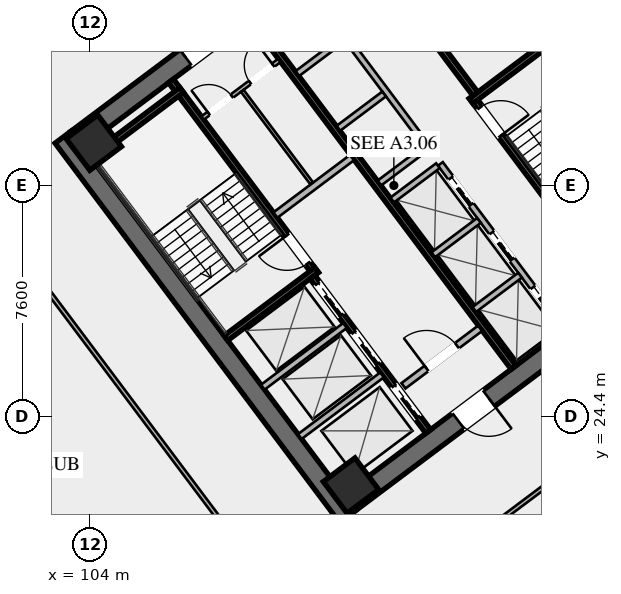
"""IFC4 building model, lengths in metres.
Left out: names, types, materials, properties, quantities, classifications, styles, units other than length and angle.
Written with IfcOpenShell. Run it as: python <this file> out.ifc"""

import sys

from ifc_helpers import new_model, si_unit, direction, frame, frame_2d, origin, origin_2d, place, context, subcontext, project, spatial, rectangle, hollow_rectangle, extrude, element, fill, save


model = new_model("IFC4")
c1 = context("Model", 3, precision=1e-05, world=origin(), true_north=direction((0.0, 1.0)))
c2 = subcontext(c1, "Body", "Model", "MODEL_VIEW")
j1 = project(units=[si_unit("LENGTHUNIT", "METRE"), si_unit("PLANEANGLEUNIT", "RADIAN")], contexts=[c1])
p1 = place(None, origin())
s1 = spatial("IfcSite", under=j1, at=p1, CompositionType="ELEMENT")
p2 = place(p1, origin())
s2 = spatial("IfcBuilding", under=s1, at=p2, CompositionType="ELEMENT")
p3 = place(p2, frame((0.0, 0.0, 24.6)))
s3 = spatial("IfcBuildingStorey", under=s2, at=p3, CompositionType="ELEMENT", Elevation=24.6)
for number, where, z_axis, x_axis in (
    (1, (112.476, 21.107, 0.0), (0.0, 0.0, 1.0), (-0.6, 0.8, 0.0)),
    (2, (115.524, 42.893, 0.0), (0.0, 0.0, 1.0), (0.6, -0.8, 0.0)),
):
    element("IfcWall", number, at=place(p3, frame(where, z_axis=z_axis, x_axis=x_axis)), inside=s3, PredefinedType="SHEAR", context=c2, shape_type="SweptSolid", body=[
        extrude(rectangle(XDim=15.6, YDim=0.65, at=frame_2d((7.8, 0.0))), origin(), (0.0, 0.0, 1.0), 3.55),
    ])
p4 = place(p3, frame((124.429, 30.478, 0.0), z_axis=(0.0, 0.0, 1.0), x_axis=(-0.799998028465, -0.600002628705, 0.0)))
e3 = element("IfcWall", 3, at=p4, inside=s3, PredefinedType="SHEAR", context=c2, shape_type="SweptSolid", body=[
    extrude(rectangle(XDim=14.86, YDim=0.65, at=frame_2d((7.43, 0.0))), origin(), (0.0, 0.0, 1.0), 3.55),
])
p5 = place(p4, frame((9.13, 0.0, 0.0)))
e4 = element("IfcOpeningElement", 4, at=p5, cuts=e3, PredefinedType="OPENING", context=c2, shape_type="SweptSolid", body=[
    extrude(rectangle(XDim=1.25, YDim=2.25, at=frame_2d((0.625, 1.125))), frame((0.0, 0.335, 0.0), z_axis=(0.0, -1.0, 0.0), x_axis=(1.0, 0.0, 0.0)), (0.0, 0.0, 1.0), 0.67),
])
p6 = place(p4, frame((4.08, 0.0, 0.0)))
e5 = element("IfcOpeningElement", 5, at=p6, cuts=e3, PredefinedType="OPENING", context=c2, shape_type="SweptSolid", body=[
    extrude(rectangle(XDim=1.25, YDim=2.25, at=frame_2d((0.625, 1.125))), frame((0.0, 0.335, 0.0), z_axis=(0.0, -1.0, 0.0), x_axis=(1.0, 0.0, 0.0)), (0.0, 0.0, 1.0), 0.67),
])
p7 = place(p3, frame((103.571, 33.522, 0.0), z_axis=(0.0, 0.0, 1.0), x_axis=(0.799998028465, 0.600002628705, 0.0)))
e6 = element("IfcWall", 6, at=p7, inside=s3, PredefinedType="SHEAR", context=c2, shape_type="SweptSolid", body=[
    extrude(rectangle(XDim=14.86, YDim=0.65, at=frame_2d((7.43, 0.0))), origin(), (0.0, 0.0, 1.0), 3.55),
])
p8 = place(p7, frame((4.48, 0.0, 0.0)))
e7 = element("IfcOpeningElement", 7, at=p8, cuts=e6, PredefinedType="OPENING", context=c2, shape_type="SweptSolid", body=[
    extrude(rectangle(XDim=1.25, YDim=2.25, at=frame_2d((0.625, 1.125))), frame((0.0, 0.335, 0.0), z_axis=(0.0, -1.0, 0.0), x_axis=(1.0, 0.0, 0.0)), (0.0, 0.0, 1.0), 0.67),
])
p9 = place(p7, frame((9.53, 0.0, 0.0)))
e8 = element("IfcOpeningElement", 8, at=p9, cuts=e6, PredefinedType="OPENING", context=c2, shape_type="SweptSolid", body=[
    extrude(rectangle(XDim=1.25, YDim=2.25, at=frame_2d((0.625, 1.125))), frame((0.0, 0.335, 0.0), z_axis=(0.0, -1.0, 0.0), x_axis=(1.0, 0.0, 0.0)), (0.0, 0.0, 1.0), 0.67),
])
for number, where, z_axis, x_axis in (
    (9, (112.59, 22.13, 0.0), (0.0, 0.0, 1.0), (0.8, 0.6, 0.0)),
    (10, (104.13, 33.41, 0.0), (0.0, 0.0, 1.0), (0.8, 0.6, 0.0)),
):
    element("IfcColumn", number, at=place(p3, frame(where, z_axis=z_axis, x_axis=x_axis)), inside=s3, PredefinedType="COLUMN", context=c2, shape_type="SweptSolid", body=[
        extrude(hollow_rectangle(XDim=1.3, YDim=1.3, WallThickness=0.05, at=origin_2d()), origin(), (0.0, 0.0, 1.0), 3.35),
    ])
p10 = place(p3, frame((111.44, 29.08, 0.0), z_axis=(0.0, 0.0, 1.0), x_axis=(-0.600009827119, 0.799992629566, 0.0)))
e11 = element("IfcWall", 11, at=p10, inside=s3, PredefinedType="SHEAR", context=c2, shape_type="SweptSolid", body=[
    extrude(rectangle(XDim=7.95, YDim=0.2, at=frame_2d((3.975, 0.0))), origin(), (0.0, 0.0, 1.0), 3.35),
])
p11 = place(p10, frame((0.45, 0.0, 0.0)))
e12 = element("IfcOpeningElement", 12, at=p11, cuts=e11, PredefinedType="OPENING", context=c2, shape_type="SweptSolid", body=[
    extrude(rectangle(XDim=1.15, YDim=2.2, at=frame_2d((0.575, 1.1))), frame((0.0, 0.11, 0.0), z_axis=(0.0, -1.0, 0.0), x_axis=(1.0, 0.0, 0.0)), (0.0, 0.0, 1.0), 0.22),
])
for number, where, z_axis, x_axis in (
    (13, (108.476, 26.982, 0.0), (0.0, 0.0, 1.0), (0.8, 0.6, 0.0)),
    (14, (104.036, 32.902, 0.0), (0.0, 0.0, 1.0), (0.8, 0.6, 0.0)),
):
    element("IfcWall", number, at=place(p3, frame(where, z_axis=z_axis, x_axis=x_axis)), inside=s3, PredefinedType="SHEAR", context=c2, shape_type="SweptSolid", body=[
        extrude(rectangle(XDim=3.73, YDim=0.2, at=frame_2d((1.865, 0.0))), origin(), (0.0, 0.0, 1.0), 3.35),
    ])
p12 = place(p3, frame((116.56, 34.92, 0.0), z_axis=(0.0, 0.0, 1.0), x_axis=(0.600009827119, -0.799992629566, 0.0)))
e15 = element("IfcWall", 15, at=p12, inside=s3, PredefinedType="SHEAR", context=c2, shape_type="SweptSolid", body=[
    extrude(rectangle(XDim=7.95, YDim=0.2, at=frame_2d((3.975, 0.0))), origin(), (0.0, 0.0, 1.0), 3.35),
])
p13 = place(p12, frame((0.45, 0.0, 0.0)))
e16 = element("IfcOpeningElement", 16, at=p13, cuts=e15, PredefinedType="OPENING", context=c2, shape_type="SweptSolid", body=[
    extrude(rectangle(XDim=1.15, YDim=2.2, at=frame_2d((0.575, 1.1))), frame((0.0, 0.11, 0.0), z_axis=(0.0, -1.0, 0.0), x_axis=(1.0, 0.0, 0.0)), (0.0, 0.0, 1.0), 0.22),
])
p14 = place(p3, frame((116.54, 34.78, 0.0), z_axis=(0.0, 0.0, 1.0), x_axis=(0.799984290658, 0.600020945218, 0.0)))
e17 = element("IfcWall", 17, at=p14, inside=s3, PredefinedType="SHEAR", context=c2, shape_type="SweptSolid", body=[
    extrude(rectangle(XDim=3.73, YDim=0.2, at=frame_2d((1.865, 0.0))), origin(), (0.0, 0.0, 1.0), 3.35),
])
p15 = place(p3, frame((117.938, 26.016, 0.0), z_axis=(0.0, 0.0, 1.0), x_axis=(-0.600005463273, 0.799995902516, 0.0)))
e18 = element("IfcWall", 18, at=p15, inside=s3, PredefinedType="SHEAR", context=c2, shape_type="SweptSolid", body=[
    extrude(rectangle(XDim=14.3, YDim=0.2, at=frame_2d((7.15, 0.0))), origin(), (0.0, 0.0, 1.0), 3.35),
])
p16 = place(p3, frame((110.104, 31.028, 0.0), z_axis=(0.0, 0.0, 1.0), x_axis=(0.800018601094, 0.59997519774, 0.0)))
e19 = element("IfcWall", 19, at=p16, inside=s3, PredefinedType="SOLIDWALL", context=c2, shape_type="SweptSolid", body=[
    extrude(rectangle(XDim=3.15, YDim=0.22, at=frame_2d((1.575, 0.0))), origin(), (0.0, 0.0, 1.0), 2.703),
])
p17 = place(p3, frame((114.316, 25.412, 0.0), z_axis=(0.0, 0.0, 1.0), x_axis=(0.800018601094, 0.59997519774, 0.0)))
e20 = element("IfcWall", 20, at=p17, inside=s3, PredefinedType="SOLIDWALL", context=c2, shape_type="SweptSolid", body=[
    extrude(rectangle(XDim=3.15, YDim=0.22, at=frame_2d((1.575, 0.0))), origin(), (0.0, 0.0, 1.0), 2.703),
])
p18 = place(p17, frame((0.95, 0.0, 0.0)))
e21 = element("IfcOpeningElement", 21, at=p18, cuts=e20, PredefinedType="OPENING", context=c2, shape_type="SweptSolid", body=[
    extrude(rectangle(XDim=1.25, YDim=2.25, at=frame_2d((0.625, 1.125))), frame((0.0, 0.12, 0.0), z_axis=(0.0, -1.0, 0.0), x_axis=(1.0, 0.0, 0.0)), (0.0, 0.0, 1.0), 0.24),
])
p19 = place(p3, frame((115.13, 23.91, 0.0), z_axis=(0.0, 0.0, 1.0), x_axis=(-0.599975393228, 0.800018454488, 0.0)))
e22 = element("IfcWall", 22, at=p19, inside=s3, PredefinedType="SHEAR", context=c2, shape_type="SweptSolid", body=[
    extrude(rectangle(XDim=6.35, YDim=0.2, at=frame_2d((3.175, 0.0))), origin(), (0.0, 0.0, 1.0), 3.35),
])
p20 = place(p19, frame((4.775, 0.0, 0.0)))
e23 = element("IfcOpeningElement", 23, at=p20, cuts=e22, PredefinedType="OPENING", context=c2, shape_type="SweptSolid", body=[
    extrude(rectangle(XDim=1.3, YDim=2.25, at=frame_2d((0.65, 1.125))), frame((0.0, 0.11, 0.0), z_axis=(0.0, -1.0, 0.0), x_axis=(1.0, 0.0, 0.0)), (0.0, 0.0, 1.0), 0.22),
])
p21 = place(p19, frame((2.775, 0.0, 0.0)))
e24 = element("IfcOpeningElement", 24, at=p21, cuts=e22, PredefinedType="OPENING", context=c2, shape_type="SweptSolid", body=[
    extrude(rectangle(XDim=1.3, YDim=2.25, at=frame_2d((0.65, 1.125))), frame((0.0, 0.11, 0.0), z_axis=(0.0, -1.0, 0.0), x_axis=(1.0, 0.0, 0.0)), (0.0, 0.0, 1.0), 0.22),
])
p22 = place(p19, frame((0.575, 0.0, 0.0)))
e25 = element("IfcOpeningElement", 25, at=p22, cuts=e22, PredefinedType="OPENING", context=c2, shape_type="SweptSolid", body=[
    extrude(rectangle(XDim=1.3, YDim=2.25, at=frame_2d((0.65, 1.125))), frame((0.0, 0.11, 0.0), z_axis=(0.0, -1.0, 0.0), x_axis=(1.0, 0.0, 0.0)), (0.0, 0.0, 1.0), 0.22),
])
for number, where, z_axis, x_axis in (
    (26, (110.906, 23.742, 0.0), (0.0, 0.0, 1.0), (0.8, 0.6, 0.0)),
    (27, (109.688, 25.366, 0.0), (0.0, 0.0, 1.0), (0.8, 0.6, 0.0)),
):
    element("IfcWall", number, at=place(p3, frame(where, z_axis=z_axis, x_axis=x_axis)), inside=s3, PredefinedType="SOLIDWALL", context=c2, shape_type="SweptSolid", body=[
        extrude(rectangle(XDim=3.38, YDim=0.2, at=frame_2d((1.69, 0.0))), origin(), (0.0, 0.0, 1.0), 3.35),
    ])
p23 = place(p3, frame((112.87, 40.09, 0.0), z_axis=(0.0, 0.0, 1.0), x_axis=(0.599975393228, -0.800018454488, 0.0)))
e28 = element("IfcWall", 28, at=p23, inside=s3, PredefinedType="SHEAR", context=c2, shape_type="SweptSolid", body=[
    extrude(rectangle(XDim=6.35, YDim=0.2, at=frame_2d((3.175, 0.0))), origin(), (0.0, 0.0, 1.0), 3.35),
])
p24 = place(p3, frame((107.71, 34.22, 0.0), z_axis=(0.0, 0.0, 1.0), x_axis=(0.799981399002, 0.60002480053, 0.0)))
e29 = element("IfcWall", 29, at=p24, inside=s3, PredefinedType="PARTITIONING", context=c2, shape_type="SweptSolid", body=[
    extrude(rectangle(XDim=3.15, YDim=0.135, at=frame_2d((1.575, 0.0))), origin(), (0.0, 0.0, 1.0), 2.703),
])
p25 = place(p24, frame((0.25, 0.0, 0.0)))
e30 = element("IfcOpeningElement", 30, at=p25, cuts=e29, PredefinedType="OPENING", context=c2, shape_type="SweptSolid", body=[
    extrude(rectangle(XDim=0.95, YDim=2.05, at=frame_2d((0.475, 1.025))), frame((0.0, 0.077, 0.0), z_axis=(0.0, -1.0, 0.0), x_axis=(1.0, 0.0, 0.0)), (0.0, 0.0, 1.0), 0.155),
])
p26 = place(p24, frame((1.95, 0.0, 0.0)))
e31 = element("IfcOpeningElement", 31, at=p26, cuts=e29, PredefinedType="OPENING", context=c2, shape_type="SweptSolid", body=[
    extrude(rectangle(XDim=0.95, YDim=2.05, at=frame_2d((0.475, 1.025))), frame((0.0, 0.077, 0.0), z_axis=(0.0, -1.0, 0.0), x_axis=(1.0, 0.0, 0.0)), (0.0, 0.0, 1.0), 0.155),
])
p27 = place(p3, frame((111.296, 32.072, 0.0), z_axis=(0.0, 0.0, 1.0), x_axis=(-0.59995887973, 0.800030838552, 0.0)))
e32 = element("IfcWall", 32, at=p27, inside=s3, PredefinedType="PARTITIONING", context=c2, shape_type="SweptSolid", body=[
    extrude(rectangle(XDim=3.8, YDim=0.11, at=frame_2d((1.9, 0.0))), origin(), (0.0, 0.0, 1.0), 2.703),
])
p28 = place(p3, frame((119.61, 27.27, 0.0), z_axis=(0.0, 0.0, 1.0), x_axis=(-0.600011488909, 0.79999138319, 0.0)))
e33 = element("IfcWall", 33, at=p28, inside=s3, PredefinedType="SOLIDWALL", context=c2, shape_type="SweptSolid", body=[
    extrude(rectangle(XDim=6.8, YDim=0.2, at=frame_2d((3.4, 0.0))), origin(), (0.0, 0.0, 1.0), 3.35),
])
p29 = place(p28, frame((0.625, 0.0, 0.0)))
e34 = element("IfcOpeningElement", 34, at=p29, cuts=e33, PredefinedType="OPENING", context=c2, shape_type="SweptSolid", body=[
    extrude(rectangle(XDim=1.1, YDim=2.2, at=frame_2d((0.55, 1.1))), frame((0.0, 0.11, 0.0), z_axis=(0.0, -1.0, 0.0), x_axis=(1.0, 0.0, 0.0)), (0.0, 0.0, 1.0), 0.22),
])
p30 = place(p28, frame((2.875, 0.0, 0.0)))
e35 = element("IfcOpeningElement", 35, at=p30, cuts=e33, PredefinedType="OPENING", context=c2, shape_type="SweptSolid", body=[
    extrude(rectangle(XDim=1.1, YDim=2.2, at=frame_2d((0.55, 1.1))), frame((0.0, 0.11, 0.0), z_axis=(0.0, -1.0, 0.0), x_axis=(1.0, 0.0, 0.0)), (0.0, 0.0, 1.0), 0.22),
])
p31 = place(p28, frame((5.125, 0.0, 0.0)))
e36 = element("IfcOpeningElement", 36, at=p31, cuts=e33, PredefinedType="OPENING", context=c2, shape_type="SweptSolid", body=[
    extrude(rectangle(XDim=1.1, YDim=2.2, at=frame_2d((0.55, 1.1))), frame((0.0, 0.11, 0.0), z_axis=(0.0, -1.0, 0.0), x_axis=(1.0, 0.0, 0.0)), (0.0, 0.0, 1.0), 0.22),
])
p32 = place(p3, frame((116.646, 27.922, 0.0), z_axis=(0.0, 0.0, 1.0), x_axis=(0.8, 0.6, 0.0)))
e37 = element("IfcWall", 37, at=p32, inside=s3, PredefinedType="SOLIDWALL", context=c2, shape_type="SweptSolid", body=[
    extrude(rectangle(XDim=1.88, YDim=0.2, at=frame_2d((0.94, 0.0))), origin(), (0.0, 0.0, 1.0), 3.35),
])
p33 = place(p3, frame((115.296, 29.722, 0.0), z_axis=(0.0, 0.0, 1.0), x_axis=(0.799984418148, 0.600020775241, 0.0)))
e38 = element("IfcWall", 38, at=p33, inside=s3, PredefinedType="SOLIDWALL", context=c2, shape_type="SweptSolid", body=[
    extrude(rectangle(XDim=1.88, YDim=0.2, at=frame_2d((0.94, 0.0))), origin(), (0.0, 0.0, 1.0), 3.35),
])
p34 = place(p3, frame((113.946, 31.522, 0.0), z_axis=(0.0, 0.0, 1.0), x_axis=(0.8, 0.6, 0.0)))
e39 = element("IfcWall", 39, at=p34, inside=s3, PredefinedType="SOLIDWALL", context=c2, shape_type="SweptSolid", body=[
    extrude(rectangle(XDim=1.88, YDim=0.2, at=frame_2d((0.94, 0.0))), origin(), (0.0, 0.0, 1.0), 3.35),
])
p35 = place(p3, frame((115.11, 33.27, 0.0), z_axis=(0.0, 0.0, 1.0), x_axis=(-0.600011488909, 0.79999138319, 0.0)))
e40 = element("IfcWall", 40, at=p35, inside=s3, PredefinedType="SOLIDWALL", context=c2, shape_type="SweptSolid", body=[
    extrude(rectangle(XDim=6.8, YDim=0.2, at=frame_2d((3.4, 0.0))), origin(), (0.0, 0.0, 1.0), 3.35),
])
p36 = place(p3, frame((113.526, 32.082, 0.0), z_axis=(0.0, 0.0, 1.0), x_axis=(0.800046745961, 0.599937666993, 0.0)))
e41 = element("IfcWall", 41, at=p36, inside=s3, PredefinedType="SOLIDWALL", context=c2, shape_type="SweptSolid", body=[
    extrude(rectangle(XDim=1.88, YDim=0.2, at=frame_2d((0.94, 0.0))), origin(), (0.0, 0.0, 1.0), 3.35),
])
p37 = place(p3, frame((112.176, 33.882, 0.0), z_axis=(0.0, 0.0, 1.0), x_axis=(0.8, 0.6, 0.0)))
e42 = element("IfcWall", 42, at=p37, inside=s3, PredefinedType="SOLIDWALL", context=c2, shape_type="SweptSolid", body=[
    extrude(rectangle(XDim=1.88, YDim=0.2, at=frame_2d((0.94, 0.0))), origin(), (0.0, 0.0, 1.0), 3.35),
])
p38 = place(p3, frame((110.826, 35.682, 0.0), z_axis=(0.0, 0.0, 1.0), x_axis=(0.799984418148, 0.600020775241, 0.0)))
e43 = element("IfcWall", 43, at=p38, inside=s3, PredefinedType="SOLIDWALL", context=c2, shape_type="SweptSolid", body=[
    extrude(rectangle(XDim=1.88, YDim=0.2, at=frame_2d((0.94, 0.0))), origin(), (0.0, 0.0, 1.0), 3.35),
])
p39 = place(p3, frame((98.516, 34.012, 0.0), z_axis=(0.0, 0.0, 1.0), x_axis=(0.799998035726, 0.600002619023, 0.0)))
e44 = element("IfcWall", 44, at=p39, inside=s3, PredefinedType="PARTITIONING", context=c2, shape_type="SweptSolid", body=[
    extrude(rectangle(XDim=29.83, YDim=0.135, at=frame_2d((14.915, 0.0))), origin(), (0.0, 0.0, 1.0), 2.703),
])
p40 = place(p39, frame((0.3, 0.0, 0.0)))
e45 = element("IfcOpeningElement", 45, at=p40, cuts=e44, PredefinedType="OPENING", context=c2, shape_type="SweptSolid", body=[
    extrude(rectangle(XDim=0.95, YDim=2.05, at=frame_2d((0.475, 1.025))), frame((0.0, 0.077, 0.0), z_axis=(0.0, -1.0, 0.0), x_axis=(1.0, 0.0, 0.0)), (0.0, 0.0, 1.0), 0.155),
])
p41 = place(p39, frame((10.829, 0.0, 0.0)))
e46 = element("IfcOpeningElement", 46, at=p41, cuts=e44, PredefinedType="OPENING", context=c2, shape_type="SweptSolid", body=[
    extrude(rectangle(XDim=0.95, YDim=2.05, at=frame_2d((0.475, 1.025))), frame((0.0, 0.077, 0.0), z_axis=(0.0, -1.0, 0.0), x_axis=(1.0, 0.0, 0.0)), (0.0, 0.0, 1.0), 0.155),
])
p42 = place(p39, frame((28.58, 0.0, 0.0)))
e47 = element("IfcOpeningElement", 47, at=p42, cuts=e44, PredefinedType="OPENING", context=c2, shape_type="SweptSolid", body=[
    extrude(rectangle(XDim=0.95, YDim=2.05, at=frame_2d((0.475, 1.025))), frame((0.0, 0.077, 0.0), z_axis=(0.0, -1.0, 0.0), x_axis=(1.0, 0.0, 0.0)), (0.0, 0.0, 1.0), 0.155),
])
p43 = place(p3, frame((135.46, 34.47, 0.0), z_axis=(0.0, 0.0, 1.0), x_axis=(-0.800000982127, -0.599998690494, 0.0)))
e48 = element("IfcWall", 48, at=p43, inside=s3, PredefinedType="PARTITIONING", context=c2, shape_type="SweptSolid", body=[
    extrude(rectangle(XDim=29.83, YDim=0.135, at=frame_2d((14.915, 0.0))), origin(), (0.0, 0.0, 1.0), 2.703),
])
p44 = place(p43, frame((28.5, 0.0, 0.0)))
e49 = element("IfcOpeningElement", 49, at=p44, cuts=e48, PredefinedType="OPENING", context=c2, shape_type="SweptSolid", body=[
    extrude(rectangle(XDim=0.95, YDim=2.05, at=frame_2d((0.475, 1.025))), frame((0.0, 0.077, 0.0), z_axis=(0.0, -1.0, 0.0), x_axis=(1.0, 0.0, 0.0)), (0.0, 0.0, 1.0), 0.155),
])
p45 = place(p43, frame((18.075, 0.0, 0.0)))
e50 = element("IfcOpeningElement", 50, at=p45, cuts=e48, PredefinedType="OPENING", context=c2, shape_type="SweptSolid", body=[
    extrude(rectangle(XDim=0.95, YDim=2.05, at=frame_2d((0.475, 1.025))), frame((0.0, 0.077, 0.0), z_axis=(0.0, -1.0, 0.0), x_axis=(1.0, 0.0, 0.0)), (0.0, 0.0, 1.0), 0.155),
])
p46 = place(p43, frame((0.38, 0.0, 0.0)))
e51 = element("IfcOpeningElement", 51, at=p46, cuts=e48, PredefinedType="OPENING", context=c2, shape_type="SweptSolid", body=[
    extrude(rectangle(XDim=0.95, YDim=2.05, at=frame_2d((0.475, 1.025))), frame((0.0, 0.077, 0.0), z_axis=(0.0, -1.0, 0.0), x_axis=(1.0, 0.0, 0.0)), (0.0, 0.0, 1.0), 0.155),
])
p47 = place(p3, frame((111.548, 16.636, 0.0), z_axis=(0.0, 0.0, 1.0), x_axis=(-0.600003610192, 0.799997292343, 0.0)))
e52 = element("IfcWall", 52, at=p47, inside=s3, PredefinedType="PARTITIONING", context=c2, shape_type="SweptSolid", body=[
    extrude(rectangle(XDim=21.64, YDim=0.135, at=frame_2d((10.82, 0.0))), origin(), (0.0, 0.0, 1.0), 2.703),
])
p48 = place(p47, frame((0.3, 0.0, 0.0)))
e53 = element("IfcOpeningElement", 53, at=p48, cuts=e52, PredefinedType="OPENING", context=c2, shape_type="SweptSolid", body=[
    extrude(rectangle(XDim=0.95, YDim=2.05, at=frame_2d((0.475, 1.025))), frame((0.0, 0.077, 0.0), z_axis=(0.0, -1.0, 0.0), x_axis=(1.0, 0.0, 0.0)), (0.0, 0.0, 1.0), 0.155),
])
p49 = place(p8, origin())
e54 = element("IfcDoor", 54, at=p49, inside=s3, OperationType="SINGLE_SWING_LEFT", PredefinedType="DOOR", context=c2, shape_type="SweptSolid", body=[
    extrude(rectangle(XDim=1.25, YDim=2.25, at=frame_2d((0.625, 1.125))), frame((0.0, 0.025, 0.0), z_axis=(0.0, -1.0, 0.0), x_axis=(1.0, 0.0, 0.0)), (0.0, 0.0, 1.0), 0.05),
])
fill(e7, e54)
p50 = place(p5, origin())
e55 = element("IfcDoor", 55, at=p50, inside=s3, OperationType="SINGLE_SWING_LEFT", PredefinedType="DOOR", context=c2, shape_type="SweptSolid", body=[
    extrude(rectangle(XDim=1.25, YDim=2.25, at=frame_2d((0.625, 1.125))), frame((0.0, 0.025, 0.0), z_axis=(0.0, -1.0, 0.0), x_axis=(1.0, 0.0, 0.0)), (0.0, 0.0, 1.0), 0.05),
])
fill(e4, e55)
p51 = place(p11, origin())
e56 = element("IfcDoor", 56, at=p51, inside=s3, OperationType="SINGLE_SWING_RIGHT", PredefinedType="DOOR", context=c2, shape_type="SweptSolid", body=[
    extrude(rectangle(XDim=1.15, YDim=2.2, at=frame_2d((0.575, 1.1))), frame((0.0, 0.025, 0.0), z_axis=(0.0, -1.0, 0.0), x_axis=(1.0, 0.0, 0.0)), (0.0, 0.0, 1.0), 0.05),
])
fill(e12, e56)
p52 = place(p13, origin())
e57 = element("IfcDoor", 57, at=p52, inside=s3, OperationType="SINGLE_SWING_RIGHT", PredefinedType="DOOR", context=c2, shape_type="SweptSolid", body=[
    extrude(rectangle(XDim=1.15, YDim=2.2, at=frame_2d((0.575, 1.1))), frame((0.0, 0.025, 0.0), z_axis=(0.0, -1.0, 0.0), x_axis=(1.0, 0.0, 0.0)), (0.0, 0.0, 1.0), 0.05),
])
fill(e16, e57)
p53 = place(p18, origin())
e58 = element("IfcDoor", 58, at=p53, inside=s3, OperationType="SINGLE_SWING_LEFT", PredefinedType="DOOR", context=c2, shape_type="SweptSolid", body=[
    extrude(rectangle(XDim=1.25, YDim=2.25, at=frame_2d((0.625, 1.125))), frame((0.0, 0.025, 0.0), z_axis=(0.0, -1.0, 0.0), x_axis=(1.0, 0.0, 0.0)), (0.0, 0.0, 1.0), 0.05),
])
fill(e21, e58)
p54 = place(p25, origin())
e59 = element("IfcDoor", 59, at=p54, inside=s3, OperationType="SINGLE_SWING_LEFT", PredefinedType="DOOR", context=c2, shape_type="SweptSolid", body=[
    extrude(rectangle(XDim=0.95, YDim=2.05, at=frame_2d((0.475, 1.025))), frame((0.0, 0.025, 0.0), z_axis=(0.0, -1.0, 0.0), x_axis=(1.0, 0.0, 0.0)), (0.0, 0.0, 1.0), 0.05),
])
fill(e30, e59)
p55 = place(p26, origin())
e60 = element("IfcDoor", 60, at=p55, inside=s3, OperationType="SINGLE_SWING_RIGHT", PredefinedType="DOOR", context=c2, shape_type="SweptSolid", body=[
    extrude(rectangle(XDim=0.95, YDim=2.05, at=frame_2d((0.475, 1.025))), frame((0.0, 0.025, 0.0), z_axis=(0.0, -1.0, 0.0), x_axis=(1.0, 0.0, 0.0)), (0.0, 0.0, 1.0), 0.05),
])
fill(e31, e60)
p56 = place(p20, origin())
e61 = element("IfcDoor", 61, at=p56, inside=s3, OperationType="SLIDING_TO_LEFT", PredefinedType="DOOR", context=c2, shape_type="SweptSolid", body=[
    extrude(rectangle(XDim=1.3, YDim=2.25, at=frame_2d((0.65, 1.125))), frame((0.0, 0.025, 0.0), z_axis=(0.0, -1.0, 0.0), x_axis=(1.0, 0.0, 0.0)), (0.0, 0.0, 1.0), 0.05),
])
fill(e23, e61)
p57 = place(p21, origin())
e62 = element("IfcDoor", 62, at=p57, inside=s3, OperationType="SLIDING_TO_LEFT", PredefinedType="DOOR", context=c2, shape_type="SweptSolid", body=[
    extrude(rectangle(XDim=1.3, YDim=2.25, at=frame_2d((0.65, 1.125))), frame((0.0, 0.025, 0.0), z_axis=(0.0, -1.0, 0.0), x_axis=(1.0, 0.0, 0.0)), (0.0, 0.0, 1.0), 0.05),
])
fill(e24, e62)
p58 = place(p22, origin())
e63 = element("IfcDoor", 63, at=p58, inside=s3, OperationType="SLIDING_TO_LEFT", PredefinedType="DOOR", context=c2, shape_type="SweptSolid", body=[
    extrude(rectangle(XDim=1.3, YDim=2.25, at=frame_2d((0.65, 1.125))), frame((0.0, 0.025, 0.0), z_axis=(0.0, -1.0, 0.0), x_axis=(1.0, 0.0, 0.0)), (0.0, 0.0, 1.0), 0.05),
])
fill(e25, e63)
p59 = place(p29, origin())
e64 = element("IfcDoor", 64, at=p59, inside=s3, OperationType="SLIDING_TO_LEFT", PredefinedType="DOOR", context=c2, shape_type="SweptSolid", body=[
    extrude(rectangle(XDim=1.1, YDim=2.2, at=frame_2d((0.55, 1.1))), frame((0.0, 0.025, 0.0), z_axis=(0.0, -1.0, 0.0), x_axis=(1.0, 0.0, 0.0)), (0.0, 0.0, 1.0), 0.05),
])
fill(e34, e64)
p60 = place(p30, origin())
e65 = element("IfcDoor", 65, at=p60, inside=s3, OperationType="SLIDING_TO_LEFT", PredefinedType="DOOR", context=c2, shape_type="SweptSolid", body=[
    extrude(rectangle(XDim=1.1, YDim=2.2, at=frame_2d((0.55, 1.1))), frame((0.0, 0.025, 0.0), z_axis=(0.0, -1.0, 0.0), x_axis=(1.0, 0.0, 0.0)), (0.0, 0.0, 1.0), 0.05),
])
fill(e35, e65)
p61 = place(p31, origin())
e66 = element("IfcDoor", 66, at=p61, inside=s3, OperationType="SLIDING_TO_LEFT", PredefinedType="DOOR", context=c2, shape_type="SweptSolid", body=[
    extrude(rectangle(XDim=1.1, YDim=2.2, at=frame_2d((0.55, 1.1))), frame((0.0, 0.025, 0.0), z_axis=(0.0, -1.0, 0.0), x_axis=(1.0, 0.0, 0.0)), (0.0, 0.0, 1.0), 0.05),
])
fill(e36, e66)
save(model, sys.argv[1])
